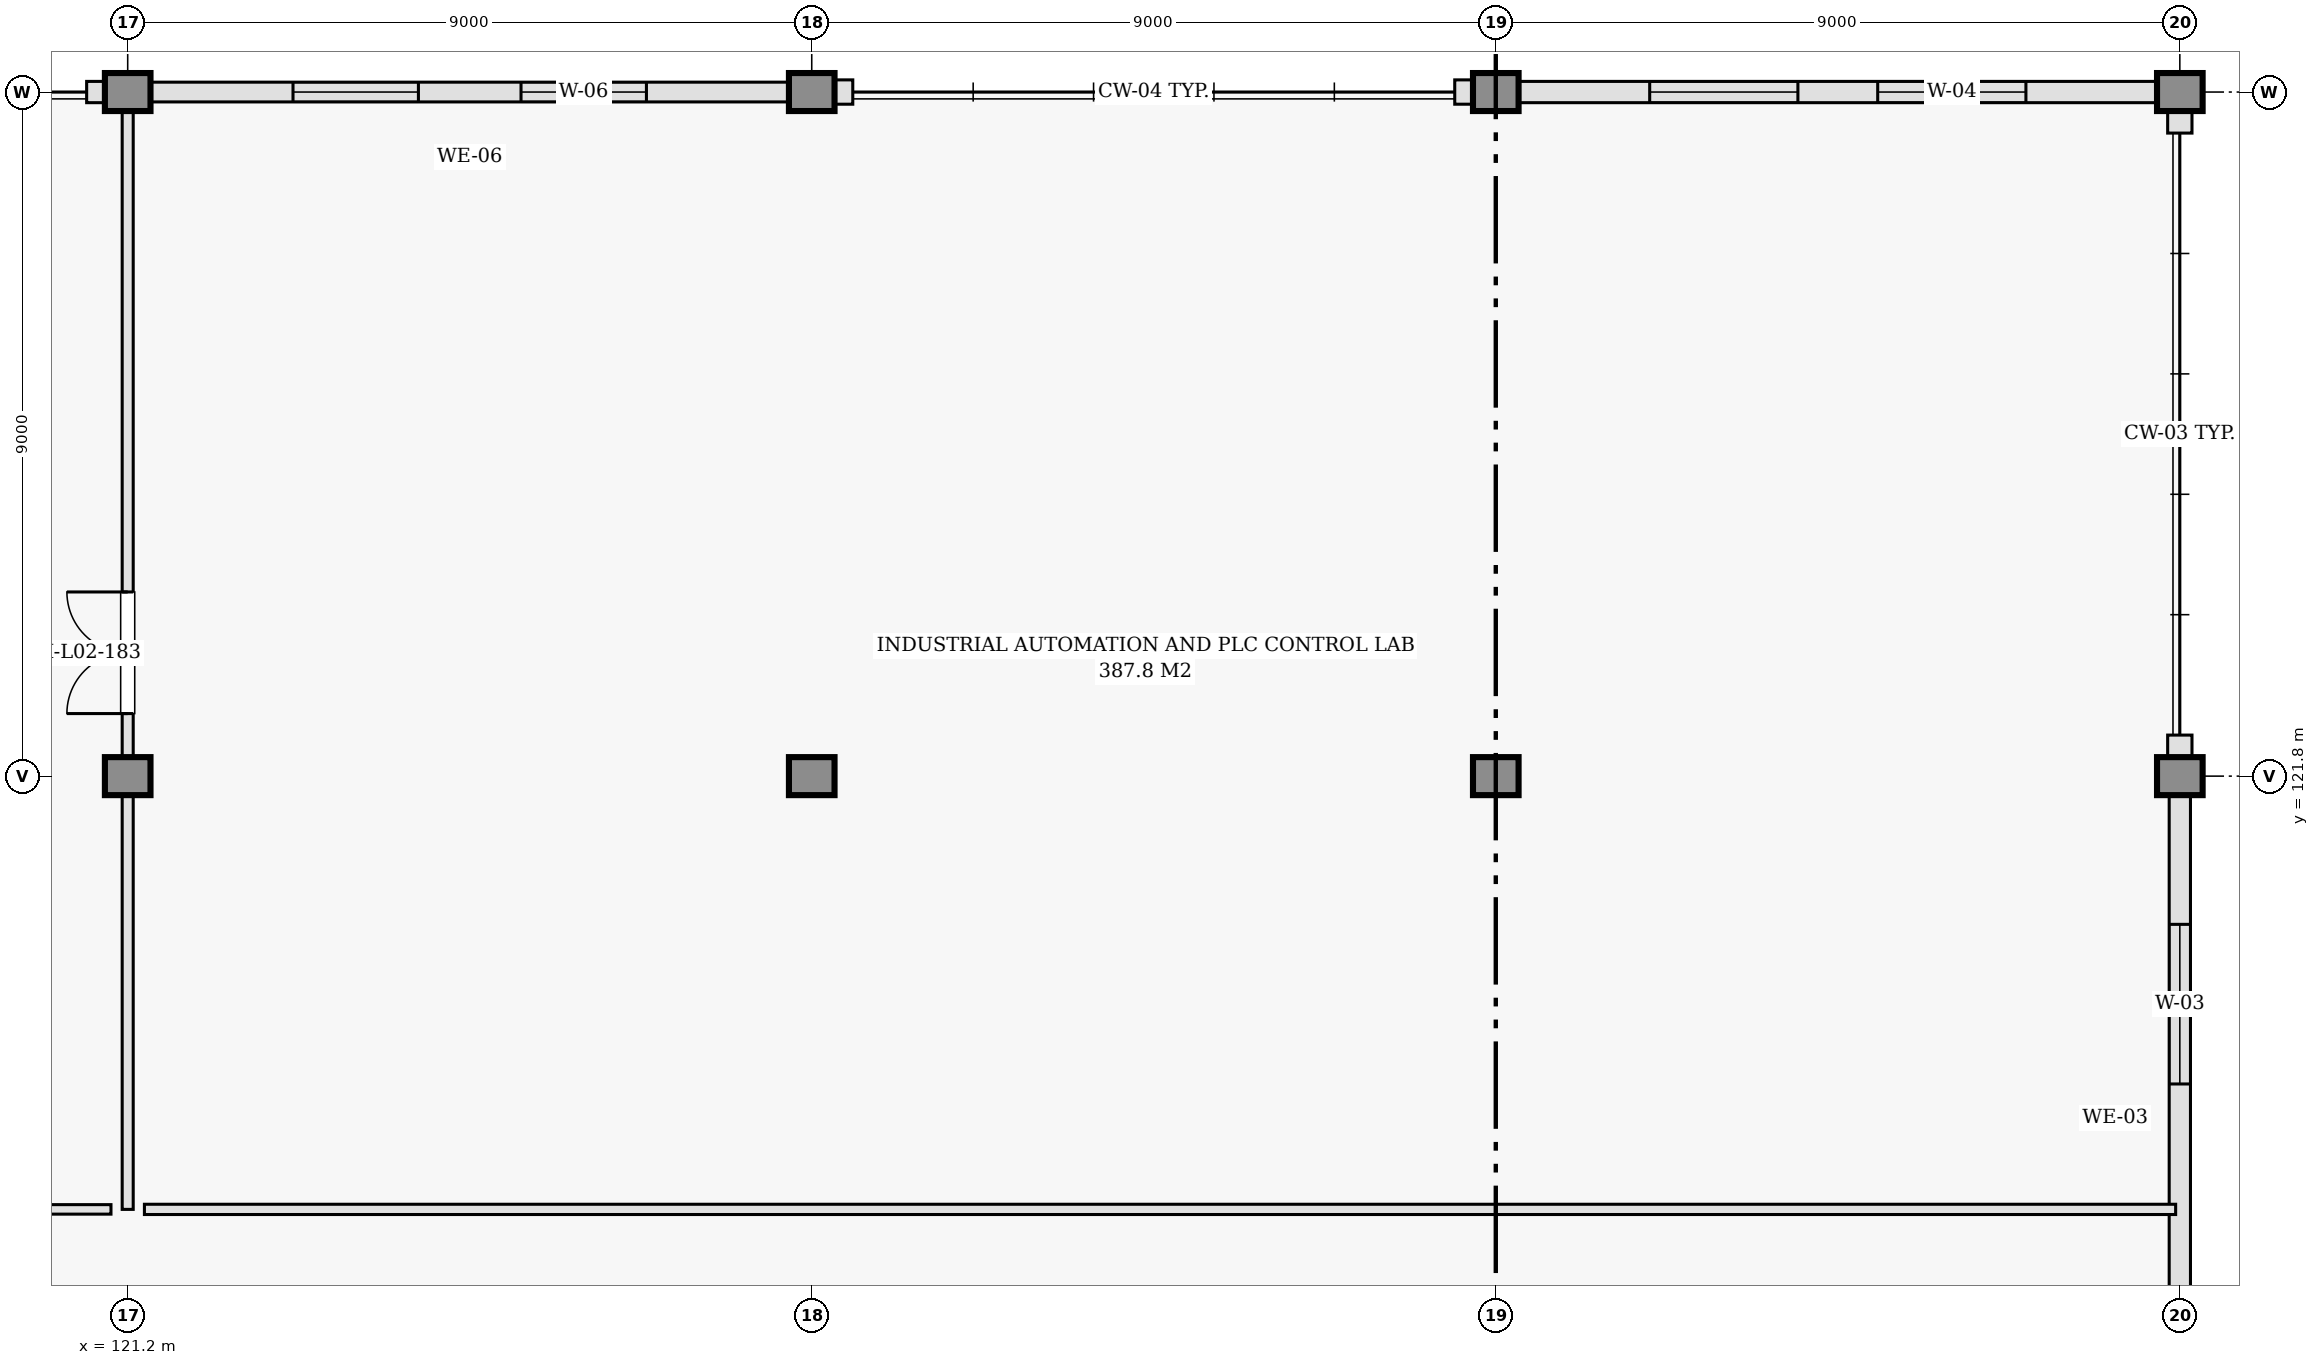
"""IFC4 building model, lengths in metres.
Left out: names, types, materials, properties, quantities, classifications, styles, units other than length and angle.
Written with IfcOpenShell. Run it as: python <this file> out.ifc"""

import sys

from ifc_helpers import new_model, si_unit, direction, frame, frame_2d, origin, origin_2d, place, context, subcontext, project, spatial, rectangle, extrude, element, fill, save


model = new_model("IFC4")
c1 = context("Model", 3, precision=1e-05, world=origin(), true_north=direction((0.0, 1.0)))
c2 = subcontext(c1, "Body", "Model", "MODEL_VIEW")
j1 = project(units=[si_unit("LENGTHUNIT", "METRE"), si_unit("PLANEANGLEUNIT", "RADIAN")], contexts=[c1])
p1 = place(None, origin())
s1 = spatial("IfcSite", under=j1, at=p1, CompositionType="ELEMENT")
p2 = place(p1, origin())
s2 = spatial("IfcBuilding", under=s1, at=p2, CompositionType="ELEMENT")
p3 = place(p2, frame((0.0, 0.0, 9.6)))
s3 = spatial("IfcBuildingStorey", under=s2, at=p3, CompositionType="ELEMENT", Elevation=9.6)
for number, where, z_axis, x_axis in (
    (1, (121.2, 121.8, 0.0), (0.0, 0.0, 1.0), (1.0, 0.0, 0.0)),
    (2, (121.2, 130.8, 0.0), (0.0, 0.0, 1.0), (1.0, 0.0, 0.0)),
    (3, (130.2, 121.8, 0.0), (0.0, 0.0, 1.0), (1.0, 0.0, 0.0)),
    (4, (130.2, 130.8, 0.0), (0.0, 0.0, 1.0), (1.0, 0.0, 0.0)),
    (5, (139.2, 121.8, 0.0), (0.0, 0.0, 1.0), (1.0, 0.0, 0.0)),
    (6, (139.2, 130.8, 0.0), (0.0, 0.0, 1.0), (1.0, 0.0, 0.0)),
    (7, (148.2, 121.8, 0.0), (0.0, 0.0, 1.0), (1.0, 0.0, 0.0)),
    (8, (148.2, 130.8, 0.0), (0.0, 0.0, 1.0), (1.0, 0.0, 0.0)),
):
    element("IfcColumn", number, at=place(p3, frame(where, z_axis=z_axis, x_axis=x_axis)), inside=s3, PredefinedType="COLUMN", context=c2, shape_type="SweptSolid", body=[
        extrude(rectangle(XDim=0.5, YDim=0.5, at=origin_2d()), origin(), (0.0, 0.0, 1.0), 4.2),
    ])
p4 = place(p3, frame((148.2, 112.8, 0.0), z_axis=(0.0, 0.0, 1.0), x_axis=(0.0, 1.0, 0.0)))
e9 = element("IfcWall", 9, at=p4, inside=s3, PredefinedType="SOLIDWALL", context=c2, shape_type="SweptSolid", body=[
    extrude(rectangle(XDim=9.0, YDim=0.28, at=frame_2d((4.5, 0.0))), origin(), (0.0, 0.0, 1.0), 3.94),
])
p5 = place(p4, frame((4.95, 0.0, 0.95)))
e10 = element("IfcOpeningElement", 10, at=p5, cuts=e9, PredefinedType="OPENING", context=c2, shape_type="SweptSolid", body=[
    extrude(rectangle(XDim=2.1, YDim=1.8, at=frame_2d((1.05, 0.9))), frame((0.0, 0.15, 0.0), z_axis=(0.0, -1.0, 0.0), x_axis=(1.0, 0.0, 0.0)), (0.0, 0.0, 1.0), 0.3),
])
p6 = place(p3, frame((148.2, 121.8, 0.0), z_axis=(0.0, 0.0, 1.0), x_axis=(0.0, 1.0, 0.0)))
e11 = element("IfcWall", 11, at=p6, inside=s3, PredefinedType="SOLIDWALL", context=c2, shape_type="SweptSolid", body=[
    extrude(rectangle(XDim=0.54, YDim=0.32, at=frame_2d((0.27, 0.0))), origin(), (0.0, 0.0, 1.0), 3.94),
])
p7 = place(p3, frame((148.2, 130.26, 0.0), z_axis=(0.0, 0.0, 1.0), x_axis=(0.0, 1.0, 0.0)))
e12 = element("IfcWall", 12, at=p7, inside=s3, PredefinedType="SOLIDWALL", context=c2, shape_type="SweptSolid", body=[
    extrude(rectangle(XDim=0.398, YDim=0.32, at=frame_2d((0.199, 0.0))), origin(), (0.0, 0.0, 1.0), 3.94),
])
p8 = place(p3, frame((148.2, 130.8, 0.0), z_axis=(0.0, 0.0, 1.0), x_axis=(-1.0, 0.0, 0.0)))
e13 = element("IfcWall", 13, at=p8, inside=s3, PredefinedType="SOLIDWALL", context=c2, shape_type="SweptSolid", body=[
    extrude(rectangle(XDim=9.0, YDim=0.28, at=frame_2d((4.5, 0.0))), origin(), (0.0, 0.0, 1.0), 3.275),
])
p9 = place(p8, frame((2.025, 0.0, 0.95)))
e14 = element("IfcOpeningElement", 14, at=p9, cuts=e13, PredefinedType="OPENING", context=c2, shape_type="SweptSolid", body=[
    extrude(rectangle(XDim=1.95, YDim=1.75, at=frame_2d((0.975, 0.875))), frame((0.0, 0.15, 0.0), z_axis=(0.0, -1.0, 0.0), x_axis=(1.0, 0.0, 0.0)), (0.0, 0.0, 1.0), 0.3),
])
p10 = place(p8, frame((5.025, 0.0, 0.95)))
e15 = element("IfcOpeningElement", 15, at=p10, cuts=e13, PredefinedType="OPENING", context=c2, shape_type="SweptSolid", body=[
    extrude(rectangle(XDim=1.95, YDim=1.75, at=frame_2d((0.975, 0.875))), frame((0.0, 0.15, 0.0), z_axis=(0.0, -1.0, 0.0), x_axis=(1.0, 0.0, 0.0)), (0.0, 0.0, 1.0), 0.3),
])
for number, where, z_axis, x_axis in (
    (16, (139.2, 130.8, 0.0), (0.0, 0.0, 1.0), (-1.0, 0.0, 0.0)),
    (17, (130.74, 130.8, 0.0), (0.0, 0.0, 1.0), (-1.0, 0.0, 0.0)),
):
    element("IfcWall", number, at=place(p3, frame(where, z_axis=z_axis, x_axis=x_axis)), inside=s3, PredefinedType="SOLIDWALL", context=c2, shape_type="SweptSolid", body=[
        extrude(rectangle(XDim=0.54, YDim=0.32, at=frame_2d((0.27, 0.0))), origin(), (0.0, 0.0, 1.0), 3.175),
    ])
p11 = place(p3, frame((130.2, 130.8, 0.0), z_axis=(0.0, 0.0, 1.0), x_axis=(-1.0, 0.0, 0.0)))
e18 = element("IfcWall", 18, at=p11, inside=s3, PredefinedType="SOLIDWALL", context=c2, shape_type="SweptSolid", body=[
    extrude(rectangle(XDim=9.0, YDim=0.26, at=frame_2d((4.5, 0.0))), origin(), (0.0, 0.0, 1.0), 3.175),
])
p12 = place(p11, frame((2.175, 0.0, 0.95)))
e19 = element("IfcOpeningElement", 19, at=p12, cuts=e18, PredefinedType="OPENING", context=c2, shape_type="SweptSolid", body=[
    extrude(rectangle(XDim=1.65, YDim=1.7, at=frame_2d((0.825, 0.85))), frame((0.0, 0.14, 0.0), z_axis=(0.0, -1.0, 0.0), x_axis=(1.0, 0.0, 0.0)), (0.0, 0.0, 1.0), 0.28),
])
p13 = place(p11, frame((5.175, 0.0, 0.95)))
e20 = element("IfcOpeningElement", 20, at=p13, cuts=e18, PredefinedType="OPENING", context=c2, shape_type="SweptSolid", body=[
    extrude(rectangle(XDim=1.65, YDim=1.7, at=frame_2d((0.825, 0.85))), frame((0.0, 0.14, 0.0), z_axis=(0.0, -1.0, 0.0), x_axis=(1.0, 0.0, 0.0)), (0.0, 0.0, 1.0), 0.28),
])
p14 = place(p3, frame((121.2, 130.8, 0.0), z_axis=(0.0, 0.0, 1.0), x_axis=(-1.0, 0.0, 0.0)))
e21 = element("IfcWall", 21, at=p14, inside=s3, PredefinedType="SOLIDWALL", context=c2, shape_type="SweptSolid", body=[
    extrude(rectangle(XDim=0.54, YDim=0.28, at=frame_2d((0.27, 0.0))), origin(), (0.0, 0.0, 1.0), 3.025),
])
p15 = place(p3, frame((121.2, 116.1, 0.0), z_axis=(0.0, 0.0, 1.0), x_axis=(0.0, 1.0, 0.0)))
e22 = element("IfcWall", 22, at=p15, inside=s3, PredefinedType="PARTITIONING", context=c2, shape_type="SweptSolid", body=[
    extrude(rectangle(XDim=14.645, YDim=0.145, at=frame_2d((7.323, 0.0))), origin(), (0.0, 0.0, 1.0), 3.275),
])
p16 = place(p15, frame((6.523, 0.0, 0.0)))
e23 = element("IfcOpeningElement", 23, at=p16, cuts=e22, PredefinedType="OPENING", context=c2, shape_type="SweptSolid", body=[
    extrude(rectangle(XDim=1.6, YDim=2.2, at=frame_2d((0.8, 1.1))), frame((0.0, 0.083, 0.0), z_axis=(0.0, -1.0, 0.0), x_axis=(1.0, 0.0, 0.0)), (0.0, 0.0, 1.0), 0.165),
])
p17 = place(p3, frame((121.42, 116.1, 0.0), z_axis=(0.0, 0.0, 1.0), x_axis=(1.0, 0.0, 0.0)))
e24 = element("IfcWall", 24, at=p17, inside=s3, PredefinedType="PARTITIONING", context=c2, shape_type="SweptSolid", body=[
    extrude(rectangle(XDim=26.725, YDim=0.135, at=frame_2d((13.363, 0.0))), origin(), (0.0, 0.0, 1.0), 3.275),
])
p18 = place(p3, frame((80.22, 116.1, 0.0), z_axis=(0.0, 0.0, 1.0), x_axis=(1.0, 0.0, 0.0)))
e25 = element("IfcWall", 25, at=p18, inside=s3, PredefinedType="PARTITIONING", context=c2, shape_type="SweptSolid", body=[
    extrude(rectangle(XDim=40.76, YDim=0.125, at=frame_2d((20.38, 0.0))), origin(), (0.0, 0.0, 1.0), 3.025),
])
p19 = place(p5, origin())
e26 = element("IfcWindow", 26, at=p19, inside=s3, PartitioningType="DOUBLE_PANEL_VERTICAL", PredefinedType="WINDOW", context=c2, shape_type="SweptSolid", body=[
    extrude(rectangle(XDim=2.1, YDim=1.8, at=frame_2d((1.05, 0.9))), frame((0.0, 0.03, 0.0), z_axis=(0.0, -1.0, 0.0), x_axis=(1.0, 0.0, 0.0)), (0.0, 0.0, 1.0), 0.06),
])
fill(e10, e26)
p20 = place(p9, origin())
e27 = element("IfcWindow", 27, at=p20, inside=s3, PartitioningType="DOUBLE_PANEL_VERTICAL", PredefinedType="WINDOW", context=c2, shape_type="SweptSolid", body=[
    extrude(rectangle(XDim=1.95, YDim=1.75, at=frame_2d((0.975, 0.875))), frame((0.0, 0.03, 0.0), z_axis=(0.0, -1.0, 0.0), x_axis=(1.0, 0.0, 0.0)), (0.0, 0.0, 1.0), 0.06),
])
fill(e14, e27)
p21 = place(p10, origin())
e28 = element("IfcWindow", 28, at=p21, inside=s3, PartitioningType="DOUBLE_PANEL_VERTICAL", PredefinedType="WINDOW", context=c2, shape_type="SweptSolid", body=[
    extrude(rectangle(XDim=1.95, YDim=1.75, at=frame_2d((0.975, 0.875))), frame((0.0, 0.03, 0.0), z_axis=(0.0, -1.0, 0.0), x_axis=(1.0, 0.0, 0.0)), (0.0, 0.0, 1.0), 0.06),
])
fill(e15, e28)
p22 = place(p12, origin())
e29 = element("IfcWindow", 29, at=p22, inside=s3, PartitioningType="DOUBLE_PANEL_VERTICAL", PredefinedType="WINDOW", context=c2, shape_type="SweptSolid", body=[
    extrude(rectangle(XDim=1.65, YDim=1.7, at=frame_2d((0.825, 0.85))), frame((0.0, 0.03, 0.0), z_axis=(0.0, -1.0, 0.0), x_axis=(1.0, 0.0, 0.0)), (0.0, 0.0, 1.0), 0.06),
])
fill(e19, e29)
p23 = place(p13, origin())
e30 = element("IfcWindow", 30, at=p23, inside=s3, PartitioningType="DOUBLE_PANEL_VERTICAL", PredefinedType="WINDOW", context=c2, shape_type="SweptSolid", body=[
    extrude(rectangle(XDim=1.65, YDim=1.7, at=frame_2d((0.825, 0.85))), frame((0.0, 0.03, 0.0), z_axis=(0.0, -1.0, 0.0), x_axis=(1.0, 0.0, 0.0)), (0.0, 0.0, 1.0), 0.06),
])
fill(e20, e30)
p24 = place(p16, origin())
e31 = element("IfcDoor", 31, at=p24, inside=s3, OperationType="DOUBLE_DOOR_SINGLE_SWING", PredefinedType="DOOR", context=c2, shape_type="SweptSolid", body=[
    extrude(rectangle(XDim=1.6, YDim=2.2, at=frame_2d((0.8, 1.1))), frame((0.0, 0.025, 0.0), z_axis=(0.0, -1.0, 0.0), x_axis=(1.0, 0.0, 0.0)), (0.0, 0.0, 1.0), 0.05),
])
fill(e23, e31)
save(model, sys.argv[1])
